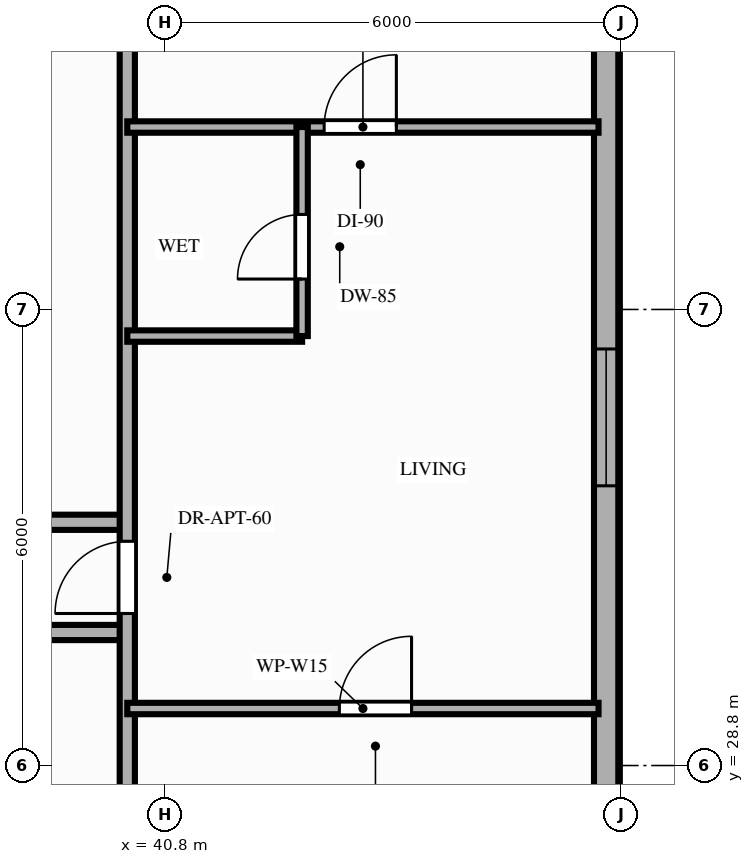
"""IFC4 building model, lengths in metres.
Left out: names, types, materials, properties, quantities, classifications, styles, units other than length and angle.
Written with IfcOpenShell. Run it as: python <this file> out.ifc"""

import sys

from ifc_helpers import new_model, si_unit, direction, frame, frame_2d, origin, place, context, subcontext, project, spatial, rectangle, extrude, element, fill, save


model = new_model("IFC4")
c1 = context("Model", 3, precision=1e-05, world=origin(), true_north=direction((0.0, 1.0)))
c2 = subcontext(c1, "Body", "Model", "MODEL_VIEW")
j1 = project(units=[si_unit("LENGTHUNIT", "METRE"), si_unit("PLANEANGLEUNIT", "RADIAN")], contexts=[c1])
p1 = place(None, origin())
s1 = spatial("IfcSite", under=j1, at=p1, CompositionType="ELEMENT")
p2 = place(p1, origin())
s2 = spatial("IfcBuilding", under=s1, at=p2, CompositionType="ELEMENT")
p3 = place(p2, frame((0.0, 0.0, 89.8)))
s3 = spatial("IfcBuildingStorey", under=s2, at=p3, CompositionType="ELEMENT", Elevation=89.8)
p4 = place(p3, frame((46.6, 26.8, 0.0), z_axis=(0.0, 0.0, 1.0), x_axis=(0.0, 1.0, 0.0)))
e1 = element("IfcWall", 1, at=p4, inside=s3, PredefinedType="STANDARD", context=c2, shape_type="SweptSolid", body=[
    extrude(rectangle(XDim=15.35, YDim=0.32, at=frame_2d((7.675, 0.0))), origin(), (0.0, 0.0, 1.0), 3.02),
])
p5 = place(p4, frame((5.68, 0.0, 0.85)))
e2 = element("IfcOpeningElement", 2, at=p5, cuts=e1, PredefinedType="OPENING", context=c2, shape_type="SweptSolid", body=[
    extrude(rectangle(XDim=1.8, YDim=1.75, at=frame_2d((0.9, 0.875))), frame((0.0, 0.17, 0.0), z_axis=(0.0, -1.0, 0.0), x_axis=(1.0, 0.0, 0.0)), (0.0, 0.0, 1.0), 0.34),
])
p6 = place(p3, frame((27.15, 30.55, 0.0), z_axis=(0.0, 0.0, 1.0), x_axis=(1.0, 0.0, 0.0)))
e3 = element("IfcWall", 3, at=p6, inside=s3, PredefinedType="PARTITIONING", context=c2, shape_type="SweptSolid", body=[
    extrude(rectangle(XDim=13.15, YDim=0.2, at=frame_2d((6.575, 0.0))), origin(), (0.0, 0.0, 1.0), 2.4),
])
p7 = place(p6, frame((2.09, 0.0, 0.0)))
e4 = element("IfcOpeningElement", 4, at=p7, cuts=e3, PredefinedType="OPENING", context=c2, shape_type="SweptSolid", body=[
    extrude(rectangle(XDim=0.95, YDim=2.15, at=frame_2d((0.475, 1.075))), frame((0.0, 0.11, 0.0), z_axis=(0.0, -1.0, 0.0), x_axis=(1.0, 0.0, 0.0)), (0.0, 0.0, 1.0), 0.22),
])
p8 = place(p6, frame((6.49, 0.0, 0.0)))
e5 = element("IfcOpeningElement", 5, at=p8, cuts=e3, PredefinedType="OPENING", context=c2, shape_type="SweptSolid", body=[
    extrude(rectangle(XDim=0.95, YDim=2.15, at=frame_2d((0.475, 1.075))), frame((0.0, 0.11, 0.0), z_axis=(0.0, -1.0, 0.0), x_axis=(1.0, 0.0, 0.0)), (0.0, 0.0, 1.0), 0.22),
])
p9 = place(p6, frame((10.5, 0.0, 0.0)))
e6 = element("IfcOpeningElement", 6, at=p9, cuts=e3, PredefinedType="OPENING", context=c2, shape_type="SweptSolid", body=[
    extrude(rectangle(XDim=0.95, YDim=2.15, at=frame_2d((0.475, 1.075))), frame((0.0, 0.11, 0.0), z_axis=(0.0, -1.0, 0.0), x_axis=(1.0, 0.0, 0.0)), (0.0, 0.0, 1.0), 0.22),
])
p10 = place(p3, frame((27.15, 32.0, 0.0), z_axis=(0.0, 0.0, 1.0), x_axis=(1.0, 0.0, 0.0)))
e7 = element("IfcWall", 7, at=p10, inside=s3, PredefinedType="PARTITIONING", context=c2, shape_type="SweptSolid", body=[
    extrude(rectangle(XDim=13.15, YDim=0.2, at=frame_2d((6.575, 0.0))), origin(), (0.0, 0.0, 1.0), 2.4),
])
p11 = place(p10, frame((1.96, 0.0, 0.0)))
e8 = element("IfcOpeningElement", 8, at=p11, cuts=e7, PredefinedType="OPENING", context=c2, shape_type="SweptSolid", body=[
    extrude(rectangle(XDim=0.95, YDim=2.15, at=frame_2d((0.475, 1.075))), frame((0.0, 0.11, 0.0), z_axis=(0.0, -1.0, 0.0), x_axis=(1.0, 0.0, 0.0)), (0.0, 0.0, 1.0), 0.22),
])
p12 = place(p10, frame((8.53, 0.0, 0.0)))
e9 = element("IfcOpeningElement", 9, at=p12, cuts=e7, PredefinedType="OPENING", context=c2, shape_type="SweptSolid", body=[
    extrude(rectangle(XDim=0.95, YDim=2.15, at=frame_2d((0.475, 1.075))), frame((0.0, 0.11, 0.0), z_axis=(0.0, -1.0, 0.0), x_axis=(1.0, 0.0, 0.0)), (0.0, 0.0, 1.0), 0.22),
])
p13 = place(p3, frame((40.3, 26.75, 0.0), z_axis=(0.0, 0.0, 1.0), x_axis=(0.0, 1.0, 0.0)))
e10 = element("IfcWall", 10, at=p13, inside=s3, PredefinedType="PARTITIONING", context=c2, shape_type="SweptSolid", body=[
    extrude(rectangle(XDim=15.45, YDim=0.2, at=frame_2d((7.725, 0.0))), origin(), (0.0, 0.0, 1.0), 2.4),
])
p14 = place(p13, frame((4.05, 0.0, 0.0)))
e11 = element("IfcOpeningElement", 11, at=p14, cuts=e10, PredefinedType="OPENING", context=c2, shape_type="SweptSolid", body=[
    extrude(rectangle(XDim=0.95, YDim=2.15, at=frame_2d((0.475, 1.075))), frame((0.0, 0.11, 0.0), z_axis=(0.0, -1.0, 0.0), x_axis=(1.0, 0.0, 0.0)), (0.0, 0.0, 1.0), 0.22),
])
p15 = place(p3, frame((40.3, 29.55, 0.0), z_axis=(0.0, 0.0, 1.0), x_axis=(1.0, 0.0, 0.0)))
e12 = element("IfcWall", 12, at=p15, inside=s3, PredefinedType="PARTITIONING", context=c2, shape_type="SweptSolid", body=[
    extrude(rectangle(XDim=6.2, YDim=0.15, at=frame_2d((3.1, 0.0))), origin(), (0.0, 0.0, 1.0), 2.4),
])
p16 = place(p15, frame((2.79, 0.0, 0.0)))
e13 = element("IfcOpeningElement", 13, at=p16, cuts=e12, PredefinedType="OPENING", context=c2, shape_type="SweptSolid", body=[
    extrude(rectangle(XDim=0.95, YDim=2.15, at=frame_2d((0.475, 1.075))), frame((0.0, 0.085, 0.0), z_axis=(0.0, -1.0, 0.0), x_axis=(1.0, 0.0, 0.0)), (0.0, 0.0, 1.0), 0.17),
])
p17 = place(p3, frame((40.3, 37.2, 0.0), z_axis=(0.0, 0.0, 1.0), x_axis=(1.0, 0.0, 0.0)))
e14 = element("IfcWall", 14, at=p17, inside=s3, PredefinedType="PARTITIONING", context=c2, shape_type="SweptSolid", body=[
    extrude(rectangle(XDim=6.2, YDim=0.15, at=frame_2d((3.1, 0.0))), origin(), (0.0, 0.0, 1.0), 2.4),
])
p18 = place(p17, frame((2.59, 0.0, 0.0)))
e15 = element("IfcOpeningElement", 15, at=p18, cuts=e14, PredefinedType="OPENING", context=c2, shape_type="SweptSolid", body=[
    extrude(rectangle(XDim=0.95, YDim=2.15, at=frame_2d((0.475, 1.075))), frame((0.0, 0.085, 0.0), z_axis=(0.0, -1.0, 0.0), x_axis=(1.0, 0.0, 0.0)), (0.0, 0.0, 1.0), 0.17),
])
p19 = place(p3, frame((40.3, 34.45, 0.0), z_axis=(0.0, 0.0, 1.0), x_axis=(1.0, 0.0, 0.0)))
e16 = element("IfcWall", 16, at=p19, inside=s3, PredefinedType="PARTITIONING", context=c2, shape_type="SweptSolid", body=[
    extrude(rectangle(XDim=2.3, YDim=0.15, at=frame_2d((1.15, 0.0))), origin(), (0.0, 0.0, 1.0), 2.4),
])
p20 = place(p3, frame((42.6, 34.45, 0.0), z_axis=(0.0, 0.0, 1.0), x_axis=(0.0, 1.0, 0.0)))
e17 = element("IfcWall", 17, at=p20, inside=s3, PredefinedType="PARTITIONING", context=c2, shape_type="SweptSolid", body=[
    extrude(rectangle(XDim=2.75, YDim=0.15, at=frame_2d((1.375, 0.0))), origin(), (0.0, 0.0, 1.0), 2.61),
])
p21 = place(p20, frame((0.75, 0.0, 0.0)))
e18 = element("IfcOpeningElement", 18, at=p21, cuts=e17, PredefinedType="OPENING", context=c2, shape_type="SweptSolid", body=[
    extrude(rectangle(XDim=0.85, YDim=2.1, at=frame_2d((0.425, 1.05))), frame((0.0, 0.085, 0.0), z_axis=(0.0, -1.0, 0.0), x_axis=(1.0, 0.0, 0.0)), (0.0, 0.0, 1.0), 0.17),
])
p22 = place(p5, origin())
e19 = element("IfcWindow", 19, at=p22, inside=s3, PartitioningType="SINGLE_PANEL", PredefinedType="WINDOW", context=c2, shape_type="SweptSolid", body=[
    extrude(rectangle(XDim=1.8, YDim=1.75, at=frame_2d((0.9, 0.875))), frame((0.0, 0.03, 0.0), z_axis=(0.0, -1.0, 0.0), x_axis=(1.0, 0.0, 0.0)), (0.0, 0.0, 1.0), 0.06),
])
fill(e2, e19)
p23 = place(p14, origin())
e20 = element("IfcDoor", 20, at=p23, inside=s3, OperationType="SINGLE_SWING_LEFT", PredefinedType="DOOR", context=c2, shape_type="SweptSolid", body=[
    extrude(rectangle(XDim=0.95, YDim=2.15, at=frame_2d((0.475, 1.075))), frame((0.0, 0.025, 0.0), z_axis=(0.0, -1.0, 0.0), x_axis=(1.0, 0.0, 0.0)), (0.0, 0.0, 1.0), 0.05),
])
fill(e11, e20)
p24 = place(p18, origin())
e21 = element("IfcDoor", 21, at=p24, inside=s3, OperationType="SINGLE_SWING_RIGHT", PredefinedType="DOOR", context=c2, shape_type="SweptSolid", body=[
    extrude(rectangle(XDim=0.95, YDim=2.15, at=frame_2d((0.475, 1.075))), frame((0.0, 0.025, 0.0), z_axis=(0.0, -1.0, 0.0), x_axis=(1.0, 0.0, 0.0)), (0.0, 0.0, 1.0), 0.05),
])
fill(e15, e21)
p25 = place(p21, origin())
e22 = element("IfcDoor", 22, at=p25, inside=s3, OperationType="SINGLE_SWING_LEFT", PredefinedType="DOOR", context=c2, shape_type="SweptSolid", body=[
    extrude(rectangle(XDim=0.85, YDim=2.1, at=frame_2d((0.425, 1.05))), frame((0.0, 0.025, 0.0), z_axis=(0.0, -1.0, 0.0), x_axis=(1.0, 0.0, 0.0)), (0.0, 0.0, 1.0), 0.05),
])
fill(e18, e22)
p26 = place(p16, origin())
e23 = element("IfcDoor", 23, at=p26, inside=s3, OperationType="SINGLE_SWING_RIGHT", PredefinedType="DOOR", context=c2, shape_type="SweptSolid", body=[
    extrude(rectangle(XDim=0.95, YDim=2.15, at=frame_2d((0.475, 1.075))), frame((0.0, 0.025, 0.0), z_axis=(0.0, -1.0, 0.0), x_axis=(1.0, 0.0, 0.0)), (0.0, 0.0, 1.0), 0.05),
])
fill(e13, e23)
save(model, sys.argv[1])
